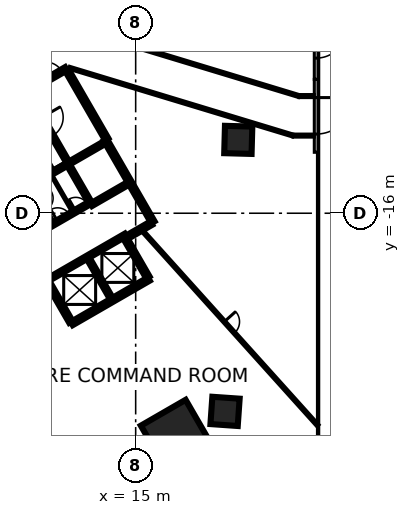
"""IFC4 building model, lengths in metres.
Left out: names, types, materials, properties, quantities, classifications, styles, units other than length and angle.
Written with IfcOpenShell. Run it as: python <this file> out.ifc"""

import sys

from ifc_helpers import new_model, si_unit, direction, frame, frame_2d, origin, origin_2d, place, context, subcontext, project, spatial, rectangle, extrude, element, fill, save


model = new_model("IFC4")
c1 = context("Model", 3, precision=1e-05, world=origin(), true_north=direction((0.0, 1.0)))
c2 = subcontext(c1, "Body", "Model", "MODEL_VIEW")
j1 = project(units=[si_unit("LENGTHUNIT", "METRE"), si_unit("PLANEANGLEUNIT", "RADIAN")], contexts=[c1])
p1 = place(None, origin())
s1 = spatial("IfcSite", under=j1, at=p1, CompositionType="ELEMENT")
p2 = place(p1, origin())
s2 = spatial("IfcBuilding", under=s1, at=p2, CompositionType="ELEMENT")
p3 = place(p2, origin())
s3 = spatial("IfcBuildingStorey", under=s2, at=p3, CompositionType="ELEMENT", Elevation=0.0)
p4 = place(p3, frame((17.865, -30.942, -0.45), z_axis=(0.0, 0.0, 1.0), x_axis=(-0.5, 0.866025403784, 0.0)))
e1 = element("IfcColumn", 1, at=p4, inside=s3, PredefinedType="COLUMN", context=c2, shape_type="SweptSolid", body=[
    extrude(rectangle(XDim=4.2, YDim=3.4, at=origin_2d()), origin(), (0.0, 0.0, 1.0), 7.55),
])
for number, where, z_axis, x_axis in (
    (2, (20.879, -29.034, -0.45), (0.0, 0.0, 1.0), (-0.998, 0.07, 0.0)),
    (3, (21.749, -11.174, -0.45), (0.0, 0.0, 1.0), (-1.0, 0.027, 0.0)),
):
    element("IfcColumn", number, at=place(p3, frame(where, z_axis=z_axis, x_axis=x_axis)), inside=s3, PredefinedType="COLUMN", context=c2, shape_type="SweptSolid", body=[
        extrude(rectangle(XDim=1.8, YDim=1.8, at=origin_2d()), origin(), (0.0, 0.0, 1.0), 5.15),
    ])
p5 = place(p3, frame((26.875, -7.195, 0.0), z_axis=(0.0, 0.0, 1.0), x_axis=(0.0, -1.0, 0.0)))
e4 = element("IfcWall", 4, at=p5, inside=s3, PredefinedType="SOLIDWALL", context=c2, shape_type="SweptSolid", body=[
    extrude(rectangle(XDim=4.797, YDim=0.25, at=frame_2d((2.398, 0.0))), origin(), (0.0, 0.0, 1.0), 7.1),
])
p6 = place(p5, frame((1.198, 0.0, 0.0)))
e5 = element("IfcOpeningElement", 5, at=p6, cuts=e4, PredefinedType="OPENING", context=c2, shape_type="SweptSolid", body=[
    extrude(rectangle(XDim=2.4, YDim=2.4, at=frame_2d((1.2, 1.2))), frame((0.0, 0.135, 0.0), z_axis=(0.0, -1.0, 0.0), x_axis=(1.0, 0.0, 0.0)), (0.0, 0.0, 1.0), 0.27),
])
p7 = place(p3, frame((26.875, -2.398, 0.0), z_axis=(0.0, 0.0, 1.0), x_axis=(0.0, -1.0, 0.0)))
e6 = element("IfcWall", 6, at=p7, inside=s3, PredefinedType="SOLIDWALL", context=c2, shape_type="SweptSolid", body=[
    extrude(rectangle(XDim=4.796, YDim=0.25, at=frame_2d((2.398, 0.0))), origin(), (0.0, 0.0, 1.0), 7.1),
])
p8 = place(p7, frame((1.398, 0.0, 0.0)))
e7 = element("IfcOpeningElement", 7, at=p8, cuts=e6, PredefinedType="OPENING", context=c2, shape_type="SweptSolid", body=[
    extrude(rectangle(XDim=2.0, YDim=2.7, at=frame_2d((1.0, 1.35))), frame((0.0, 0.135, 0.0), z_axis=(0.0, -1.0, 0.0), x_axis=(1.0, 0.0, 0.0)), (0.0, 0.0, 1.0), 0.27),
])
p9 = place(p3, frame((0.417, -12.273, 0.0), z_axis=(0.0, 0.0, 1.0), x_axis=(0.866021906294, 0.500006057782, 0.0)))
e8 = element("IfcWall", 8, at=p9, inside=s3, PredefinedType="SHEAR", context=c2, shape_type="SweptSolid", body=[
    extrude(rectangle(XDim=11.55, YDim=0.25, at=frame_2d((5.775, 0.0))), origin(), (0.0, 0.0, 1.0), 7.1),
])
p10 = place(p9, frame((10.025, 0.0, 0.0)))
e9 = element("IfcOpeningElement", 9, at=p10, cuts=e8, PredefinedType="OPENING", context=c2, shape_type="SweptSolid", body=[
    extrude(rectangle(XDim=1.2, YDim=2.1, at=frame_2d((0.6, 1.05))), frame((0.0, 0.135, 0.0), z_axis=(0.0, -1.0, 0.0), x_axis=(1.0, 0.0, 0.0)), (0.0, 0.0, 1.0), 0.27),
])
p11 = place(p9, frame((8.725, 0.0, 0.0)))
e10 = element("IfcOpeningElement", 10, at=p11, cuts=e8, PredefinedType="OPENING", context=c2, shape_type="SweptSolid", body=[
    extrude(rectangle(XDim=1.2, YDim=2.1, at=frame_2d((0.6, 1.05))), frame((0.0, 0.135, 0.0), z_axis=(0.0, -1.0, 0.0), x_axis=(1.0, 0.0, 0.0)), (0.0, 0.0, 1.0), 0.27),
])
p12 = place(p3, frame((13.008, -11.181, 0.0), z_axis=(0.0, 0.0, 1.0), x_axis=(0.500004234368, -0.866022959057, 0.0)))
e11 = element("IfcWall", 11, at=p12, inside=s3, PredefinedType="SHEAR", context=c2, shape_type="SweptSolid", body=[
    extrude(rectangle(XDim=6.25, YDim=0.25, at=frame_2d((3.125, 0.0))), origin(), (0.0, 0.0, 1.0), 7.1),
])
p13 = place(p3, frame((15.865, -20.328, 0.0), z_axis=(0.0, 0.0, 1.0), x_axis=(-0.86602852612, -0.499994591916, 0.0)))
e12 = element("IfcWall", 12, at=p13, inside=s3, PredefinedType="SHEAR", context=c2, shape_type="SweptSolid", body=[
    extrude(rectangle(XDim=5.85, YDim=0.25, at=frame_2d((2.925, 0.0))), origin(), (0.0, 0.0, 1.0), 7.1),
])
p14 = place(p3, frame((10.483, -6.606, 0.0), z_axis=(0.0, 0.0, 1.0), x_axis=(0.49999885962, -0.866026062182, 0.0)))
e13 = element("IfcWall", 13, at=p14, inside=s3, PredefinedType="SHEAR", context=c2, shape_type="SweptSolid", body=[
    extrude(rectangle(XDim=5.225, YDim=0.25, at=frame_2d((2.612, 0.0))), origin(), (0.0, 0.0, 1.0), 7.1),
])
for number, where, z_axis, x_axis in (
    (14, (14.315, -17.644, 0.0), (0.0, 0.0, 1.0), (0.5, -0.866, 0.0)),
    (15, (10.736, -23.145, 0.0), (0.0, 0.0, 1.0), (-0.5, 0.866, 0.0)),
):
    element("IfcWall", number, at=place(p3, frame(where, z_axis=z_axis, x_axis=x_axis)), inside=s3, PredefinedType="SHEAR", context=c2, shape_type="SweptSolid", body=[
        extrude(rectangle(XDim=2.974, YDim=0.25, at=frame_2d((1.487, 0.0))), origin(), (0.0, 0.0, 1.0), 7.1),
    ])
p15 = place(p3, frame((16.025, -16.656, 0.0), z_axis=(0.0, 0.0, 1.0), x_axis=(-0.866016279763, -0.500015802937, 0.0)))
e16 = element("IfcWall", 16, at=p15, inside=s3, PredefinedType="SHEAR", context=c2, shape_type="SweptSolid", body=[
    extrude(rectangle(XDim=1.849, YDim=0.25, at=frame_2d((0.925, 0.0))), origin(), (0.0, 0.0, 1.0), 7.1),
])
p16 = place(p3, frame((9.052, -20.48, 0.0), z_axis=(0.0, 0.0, 1.0), x_axis=(0.866030299012, 0.499991521122, 0.0)))
e17 = element("IfcWall", 17, at=p16, inside=s3, PredefinedType="SHEAR", context=c2, shape_type="SweptSolid", body=[
    extrude(rectangle(XDim=6.1, YDim=0.2, at=frame_2d((3.05, 0.0))), origin(), (0.0, 0.0, 1.0), 7.1),
])
p17 = place(p16, frame((1.0, 0.0, 0.0)))
e18 = element("IfcOpeningElement", 18, at=p17, cuts=e17, PredefinedType="OPENING", context=c2, shape_type="SweptSolid", body=[
    extrude(rectangle(XDim=1.2, YDim=2.1, at=frame_2d((0.6, 1.05))), frame((0.0, 0.11, 0.0), z_axis=(0.0, -1.0, 0.0), x_axis=(1.0, 0.0, 0.0)), (0.0, 0.0, 1.0), 0.22),
])
p18 = place(p16, frame((4.05, 0.0, 0.0)))
e19 = element("IfcOpeningElement", 19, at=p18, cuts=e17, PredefinedType="OPENING", context=c2, shape_type="SweptSolid", body=[
    extrude(rectangle(XDim=1.2, YDim=2.1, at=frame_2d((0.6, 1.05))), frame((0.0, 0.11, 0.0), z_axis=(0.0, -1.0, 0.0), x_axis=(1.0, 0.0, 0.0)), (0.0, 0.0, 1.0), 0.22),
])
p19 = place(p3, frame((10.538, -12.752, 0.0), z_axis=(0.0, 0.0, 1.0), x_axis=(-0.866038630372, -0.499977090179, 0.0)))
e20 = element("IfcWall", 20, at=p19, inside=s3, PredefinedType="SHEAR", context=c2, shape_type="SweptSolid", body=[
    extrude(rectangle(XDim=5.699, YDim=0.2, at=frame_2d((2.85, 0.0))), origin(), (0.0, 0.0, 1.0), 7.1),
])
p20 = place(p3, frame((7.077, -18.156, 0.0), z_axis=(0.0, 0.0, 1.0), x_axis=(0.866038630372, 0.499977090179, 0.0)))
e21 = element("IfcWall", 21, at=p20, inside=s3, PredefinedType="SHEAR", context=c2, shape_type="SweptSolid", body=[
    extrude(rectangle(XDim=5.699, YDim=0.2, at=frame_2d((2.85, 0.0))), origin(), (0.0, 0.0, 1.0), 7.1),
])
p21 = place(p20, frame((3.224, 0.0, 0.0)))
e22 = element("IfcOpeningElement", 22, at=p21, cuts=e21, PredefinedType="OPENING", context=c2, shape_type="SweptSolid", body=[
    extrude(rectangle(XDim=0.9, YDim=2.1, at=frame_2d((0.45, 1.05))), frame((0.0, 0.11, 0.0), z_axis=(0.0, -1.0, 0.0), x_axis=(1.0, 0.0, 0.0)), (0.0, 0.0, 1.0), 0.22),
])
p22 = place(p20, frame((4.599, 0.0, 0.0)))
e23 = element("IfcOpeningElement", 23, at=p22, cuts=e21, PredefinedType="OPENING", context=c2, shape_type="SweptSolid", body=[
    extrude(rectangle(XDim=0.9, YDim=2.1, at=frame_2d((0.45, 1.05))), frame((0.0, 0.11, 0.0), z_axis=(0.0, -1.0, 0.0), x_axis=(1.0, 0.0, 0.0)), (0.0, 0.0, 1.0), 0.22),
])
p23 = place(p3, frame((7.906, -8.094, 0.0), z_axis=(0.0, 0.0, 1.0), x_axis=(0.500024287448, -0.866011380966, 0.0)))
e24 = element("IfcWall", 24, at=p23, inside=s3, PredefinedType="SHEAR", context=c2, shape_type="SweptSolid", body=[
    extrude(rectangle(XDim=5.251, YDim=0.2, at=frame_2d((2.625, 0.0))), origin(), (0.0, 0.0, 1.0), 7.1),
])
p24 = place(p23, frame((1.849, 0.0, 0.0)))
e25 = element("IfcOpeningElement", 25, at=p24, cuts=e24, PredefinedType="OPENING", context=c2, shape_type="SweptSolid", body=[
    extrude(rectangle(XDim=1.4, YDim=2.1, at=frame_2d((0.7, 1.05))), frame((0.0, 0.11, 0.0), z_axis=(0.0, -1.0, 0.0), x_axis=(1.0, 0.0, 0.0)), (0.0, 0.0, 1.0), 0.22),
])
p25 = place(p3, frame((11.875, -18.967, 0.0), z_axis=(0.0, 0.0, 1.0), x_axis=(0.49998131003, -0.866036194175, 0.0)))
e26 = element("IfcWall", 26, at=p25, inside=s3, PredefinedType="SHEAR", context=c2, shape_type="SweptSolid", body=[
    extrude(rectangle(XDim=3.048, YDim=0.2, at=frame_2d((1.524, 0.0))), origin(), (0.0, 0.0, 1.0), 7.1),
])
p26 = place(p3, frame((11.963, -15.22, 0.0), z_axis=(0.0, 0.0, 1.0), x_axis=(-0.500034990121, 0.866005201286, 0.0)))
e27 = element("IfcWall", 27, at=p26, inside=s3, PredefinedType="SHEAR", context=c2, shape_type="SweptSolid", body=[
    extrude(rectangle(XDim=2.75, YDim=0.2, at=frame_2d((1.375, 0.0))), origin(), (0.0, 0.0, 1.0), 7.1),
])
p27 = place(p3, frame((10.587, -12.723, 0.0), z_axis=(0.0, 0.0, 1.0), x_axis=(0.866037306777, 0.499979382845, 0.0)))
e28 = element("IfcWall", 28, at=p27, inside=s3, PredefinedType="SHEAR", context=c2, shape_type="SweptSolid", body=[
    extrude(rectangle(XDim=2.742, YDim=0.2, at=frame_2d((1.371, 0.0))), origin(), (0.0, 0.0, 1.0), 7.1),
])
p28 = place(p27, frame((0.743, 0.0, 0.0)))
e29 = element("IfcOpeningElement", 29, at=p28, cuts=e28, PredefinedType="OPENING", context=c2, shape_type="SweptSolid", body=[
    extrude(rectangle(XDim=1.3, YDim=2.1, at=frame_2d((0.65, 1.05))), frame((0.0, 0.11, 0.0), z_axis=(0.0, -1.0, 0.0), x_axis=(1.0, 0.0, 0.0)), (0.0, 0.0, 1.0), 0.22),
])
p29 = place(p3, frame((14.512, -14.037, 0.0), z_axis=(0.0, 0.0, 1.0), x_axis=(-0.866044696403, -0.499966582715, 0.0)))
e30 = element("IfcWall", 30, at=p29, inside=s3, PredefinedType="SHEAR", context=c2, shape_type="SweptSolid", body=[
    extrude(rectangle(XDim=2.799, YDim=0.2, at=frame_2d((1.399, 0.0))), origin(), (0.0, 0.0, 1.0), 7.1),
])
p30 = place(p3, frame((8.207, -14.214, 0.0), z_axis=(0.0, 0.0, 1.0), x_axis=(0.50002746344, -0.86600954718, 0.0)))
e31 = element("IfcWall", 31, at=p30, inside=s3, PredefinedType="PARTITIONING", context=c2, shape_type="SweptSolid", body=[
    extrude(rectangle(XDim=2.748, YDim=0.15, at=frame_2d((1.374, 0.0))), origin(), (0.0, 0.0, 1.0), 7.1),
])
p31 = place(p30, frame((0.924, 0.0, 0.0)))
e32 = element("IfcOpeningElement", 32, at=p31, cuts=e31, PredefinedType="OPENING", context=c2, shape_type="SweptSolid", body=[
    extrude(rectangle(XDim=0.9, YDim=2.1, at=frame_2d((0.45, 1.05))), frame((0.0, 0.085, 0.0), z_axis=(0.0, -1.0, 0.0), x_axis=(1.0, 0.0, 0.0)), (0.0, 0.0, 1.0), 0.17),
])
p32 = place(p3, frame((9.462, -13.489, 0.0), z_axis=(0.0, 0.0, 1.0), x_axis=(0.499988999718, -0.866031754707, 0.0)))
e33 = element("IfcWall", 33, at=p32, inside=s3, PredefinedType="PARTITIONING", context=c2, shape_type="SweptSolid", body=[
    extrude(rectangle(XDim=2.749, YDim=0.15, at=frame_2d((1.374, 0.0))), origin(), (0.0, 0.0, 1.0), 7.1),
])
p33 = place(p3, frame((6.584, -5.605, 0.0), z_axis=(0.0, 0.0, 1.0), x_axis=(0.872179971593, 0.489185135867, 0.0)))
e34 = element("IfcWall", 34, at=p33, inside=s3, PredefinedType="PARTITIONING", context=c2, shape_type="SweptSolid", body=[
    extrude(rectangle(XDim=3.577, YDim=0.2, at=frame_2d((1.789, 0.0))), origin(), (0.0, 0.0, 1.0), 7.1),
])
p34 = place(p3, frame((10.617, -6.426, 0.0), z_axis=(0.0, 0.0, 1.0), x_axis=(0.957017605076, -0.290029832216, 0.0)))
e35 = element("IfcWall", 35, at=p34, inside=s3, PredefinedType="PARTITIONING", context=c2, shape_type="SweptSolid", body=[
    extrude(rectangle(XDim=15.402, YDim=0.2, at=frame_2d((7.701, 0.0))), origin(), (0.0, 0.0, 1.0), 4.7),
])
p35 = place(p3, frame((10.961, -3.813, 0.0), z_axis=(0.0, 0.0, 1.0), x_axis=(0.957013768883, -0.29004249028, 0.0)))
e36 = element("IfcWall", 36, at=p35, inside=s3, PredefinedType="PARTITIONING", context=c2, shape_type="SweptSolid", body=[
    extrude(rectangle(XDim=15.446, YDim=0.2, at=frame_2d((7.723, 0.0))), origin(), (0.0, 0.0, 1.0), 4.7),
])
p36 = place(p3, frame((25.357, -10.893, 0.0), z_axis=(0.0, 0.0, 1.0), x_axis=(1.0, 0.0, 0.0)))
e37 = element("IfcWall", 37, at=p36, inside=s3, PredefinedType="PARTITIONING", context=c2, shape_type="SweptSolid", body=[
    extrude(rectangle(XDim=1.393, YDim=0.2, at=frame_2d((0.697, 0.0))), origin(), (0.0, 0.0, 1.0), 7.1),
])
p37 = place(p3, frame((25.743, -8.293, 0.0), z_axis=(0.0, 0.0, 1.0), x_axis=(1.0, 0.0, 0.0)))
e38 = element("IfcWall", 38, at=p37, inside=s3, PredefinedType="PARTITIONING", context=c2, shape_type="SweptSolid", body=[
    extrude(rectangle(XDim=1.007, YDim=0.2, at=frame_2d((0.503, 0.0))), origin(), (0.0, 0.0, 1.0), 7.1),
])
p38 = place(p3, frame((15.475, -17.188, 0.0), z_axis=(0.0, 0.0, 1.0), x_axis=(0.669166821611, -0.74311221552, 0.0)))
e39 = element("IfcWall", 39, at=p38, inside=s3, PredefinedType="PARTITIONING", context=c2, shape_type="SweptSolid", body=[
    extrude(rectangle(XDim=17.218, YDim=0.2, at=frame_2d((8.609, 0.0))), origin(), (0.0, 0.0, 1.0), 4.7),
])
p39 = place(p38, frame((8.006, 0.0, 0.0)))
e40 = element("IfcOpeningElement", 40, at=p39, cuts=e39, PredefinedType="OPENING", context=c2, shape_type="SweptSolid", body=[
    extrude(rectangle(XDim=1.0, YDim=2.1, at=frame_2d((0.5, 1.05))), frame((0.0, 0.11, 0.0), z_axis=(0.0, -1.0, 0.0), x_axis=(1.0, 0.0, 0.0)), (0.0, 0.0, 1.0), 0.22),
])
p40 = place(p8, origin())
e41 = element("IfcDoor", 41, at=p40, inside=s3, OperationType="DOUBLE_DOOR_DOUBLE_SWING", PredefinedType="DOOR", context=c2, shape_type="SweptSolid", body=[
    extrude(rectangle(XDim=2.0, YDim=2.7, at=frame_2d((1.0, 1.35))), frame((0.0, 0.025, 0.0), z_axis=(0.0, -1.0, 0.0), x_axis=(1.0, 0.0, 0.0)), (0.0, 0.0, 1.0), 0.05),
])
fill(e7, e41)
p41 = place(p6, origin())
e42 = element("IfcDoor", 42, at=p41, inside=s3, OperationType="DOUBLE_DOOR_DOUBLE_SWING", PredefinedType="DOOR", context=c2, shape_type="SweptSolid", body=[
    extrude(rectangle(XDim=2.4, YDim=2.4, at=frame_2d((1.2, 1.2))), frame((0.0, 0.025, 0.0), z_axis=(0.0, -1.0, 0.0), x_axis=(1.0, 0.0, 0.0)), (0.0, 0.0, 1.0), 0.05),
])
fill(e5, e42)
p42 = place(p28, origin())
e43 = element("IfcDoor", 43, at=p42, inside=s3, OperationType="SLIDING_TO_RIGHT", PredefinedType="DOOR", context=c2, shape_type="SweptSolid", body=[
    extrude(rectangle(XDim=1.3, YDim=2.1, at=frame_2d((0.65, 1.05))), frame((0.0, 0.025, 0.0), z_axis=(0.0, -1.0, 0.0), x_axis=(1.0, 0.0, 0.0)), (0.0, 0.0, 1.0), 0.05),
])
fill(e29, e43)
p43 = place(p17, origin())
e44 = element("IfcDoor", 44, at=p43, inside=s3, OperationType="DOUBLE_DOOR_SLIDING", PredefinedType="DOOR", context=c2, shape_type="SweptSolid", body=[
    extrude(rectangle(XDim=1.2, YDim=2.1, at=frame_2d((0.6, 1.05))), frame((0.0, 0.025, 0.0), z_axis=(0.0, -1.0, 0.0), x_axis=(1.0, 0.0, 0.0)), (0.0, 0.0, 1.0), 0.05),
])
fill(e18, e44)
p44 = place(p18, origin())
e45 = element("IfcDoor", 45, at=p44, inside=s3, OperationType="DOUBLE_DOOR_SLIDING", PredefinedType="DOOR", context=c2, shape_type="SweptSolid", body=[
    extrude(rectangle(XDim=1.2, YDim=2.1, at=frame_2d((0.6, 1.05))), frame((0.0, 0.025, 0.0), z_axis=(0.0, -1.0, 0.0), x_axis=(1.0, 0.0, 0.0)), (0.0, 0.0, 1.0), 0.05),
])
fill(e19, e45)
p45 = place(p10, origin())
e46 = element("IfcDoor", 46, at=p45, inside=s3, OperationType="SINGLE_SWING_LEFT", PredefinedType="DOOR", context=c2, shape_type="SweptSolid", body=[
    extrude(rectangle(XDim=1.2, YDim=2.1, at=frame_2d((0.6, 1.05))), frame((0.0, 0.025, 0.0), z_axis=(0.0, -1.0, 0.0), x_axis=(1.0, 0.0, 0.0)), (0.0, 0.0, 1.0), 0.05),
])
fill(e9, e46)
p46 = place(p24, origin())
e47 = element("IfcDoor", 47, at=p46, inside=s3, OperationType="SINGLE_SWING_RIGHT", PredefinedType="DOOR", context=c2, shape_type="SweptSolid", body=[
    extrude(rectangle(XDim=1.4, YDim=2.1, at=frame_2d((0.7, 1.05))), frame((0.0, 0.025, 0.0), z_axis=(0.0, -1.0, 0.0), x_axis=(1.0, 0.0, 0.0)), (0.0, 0.0, 1.0), 0.05),
])
fill(e25, e47)
p47 = place(p21, origin())
e48 = element("IfcDoor", 48, at=p47, inside=s3, OperationType="SINGLE_SWING_LEFT", PredefinedType="DOOR", context=c2, shape_type="SweptSolid", body=[
    extrude(rectangle(XDim=0.9, YDim=2.1, at=frame_2d((0.45, 1.05))), frame((0.0, 0.025, 0.0), z_axis=(0.0, -1.0, 0.0), x_axis=(1.0, 0.0, 0.0)), (0.0, 0.0, 1.0), 0.05),
])
fill(e22, e48)
p48 = place(p22, origin())
e49 = element("IfcDoor", 49, at=p48, inside=s3, OperationType="SINGLE_SWING_RIGHT", PredefinedType="DOOR", context=c2, shape_type="SweptSolid", body=[
    extrude(rectangle(XDim=0.9, YDim=2.1, at=frame_2d((0.45, 1.05))), frame((0.0, 0.025, 0.0), z_axis=(0.0, -1.0, 0.0), x_axis=(1.0, 0.0, 0.0)), (0.0, 0.0, 1.0), 0.05),
])
fill(e23, e49)
p49 = place(p39, origin())
e50 = element("IfcDoor", 50, at=p49, inside=s3, OperationType="SINGLE_SWING_LEFT", PredefinedType="DOOR", context=c2, shape_type="SweptSolid", body=[
    extrude(rectangle(XDim=1.0, YDim=2.1, at=frame_2d((0.5, 1.05))), frame((0.0, 0.025, 0.0), z_axis=(0.0, -1.0, 0.0), x_axis=(1.0, 0.0, 0.0)), (0.0, 0.0, 1.0), 0.05),
])
fill(e40, e50)
save(model, sys.argv[1])
